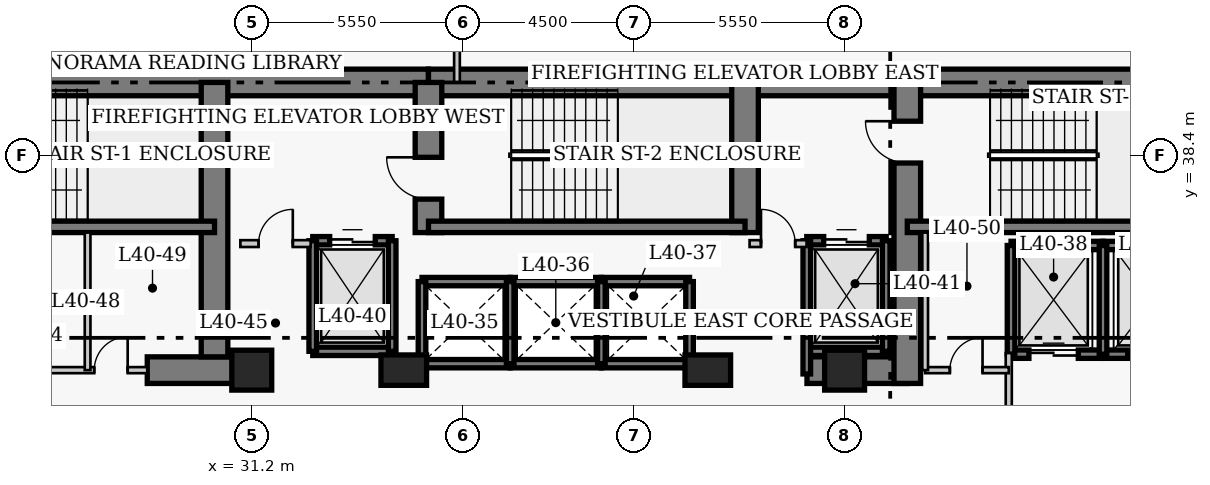
"""IFC4 building model, lengths in metres.
Left out: names, types, materials, properties, quantities, classifications, styles, units other than length and angle.
Written with IfcOpenShell. Run it as: python <this file> out.ifc"""

import sys

from ifc_helpers import new_model, si_unit, direction, frame, frame_2d, origin, origin_2d, place, context, subcontext, project, spatial, rectangle, extrude, element, fill, save


model = new_model("IFC4")
c1 = context("Model", 3, precision=1e-05, world=origin(), true_north=direction((0.0, 1.0)))
c2 = subcontext(c1, "Body", "Model", "MODEL_VIEW")
j1 = project(units=[si_unit("LENGTHUNIT", "METRE"), si_unit("PLANEANGLEUNIT", "RADIAN")], contexts=[c1])
p1 = place(None, origin())
s1 = spatial("IfcSite", under=j1, at=p1, CompositionType="ELEMENT")
p2 = place(p1, origin())
s2 = spatial("IfcBuilding", under=s1, at=p2, CompositionType="ELEMENT")
p3 = place(p2, frame((0.0, 0.0, 161.2)))
s3 = spatial("IfcBuildingStorey", under=s2, at=p3, CompositionType="ELEMENT", Elevation=161.2)
p4 = place(p3, frame((21.55, 40.32, 0.0), z_axis=(0.0, 0.0, 1.0), x_axis=(1.0, 0.0, 0.0)))
e1 = element("IfcWall", 1, at=p4, inside=s3, PredefinedType="SHEAR", context=c2, shape_type="SweptSolid", body=[
    extrude(rectangle(XDim=14.3, YDim=0.7, at=frame_2d((7.15, 0.0))), origin(), (0.0, 0.0, 1.0), 3.8),
])
p5 = place(p3, frame((35.85, 40.32, 0.0), z_axis=(0.0, 0.0, 1.0), x_axis=(1.0, 0.0, 0.0)))
e2 = element("IfcWall", 2, at=p5, inside=s3, PredefinedType="SHEAR", context=c2, shape_type="SweptSolid", body=[
    extrude(rectangle(XDim=12.6, YDim=0.7, at=frame_2d((6.3, 0.0))), origin(), (0.0, 0.0, 1.0), 3.8),
])
p6 = place(p3, frame((48.45, 40.32, 0.0), z_axis=(0.0, 0.0, 1.0), x_axis=(1.0, 0.0, 0.0)))
e3 = element("IfcWall", 3, at=p6, inside=s3, PredefinedType="SHEAR", context=c2, shape_type="SweptSolid", body=[
    extrude(rectangle(XDim=8.77, YDim=0.7, at=frame_2d((4.385, 0.0))), origin(), (0.0, 0.0, 1.0), 3.8),
])
p7 = place(p3, frame((28.45, 32.75, 0.0), z_axis=(0.0, 0.0, 1.0), x_axis=(1.0, 0.0, 0.0)))
e4 = element("IfcWall", 4, at=p7, inside=s3, PredefinedType="SHEAR", context=c2, shape_type="SweptSolid", body=[
    extrude(rectangle(XDim=2.4, YDim=0.7, at=frame_2d((1.2, 0.0))), origin(), (0.0, 0.0, 1.0), 3.8),
])
p8 = place(p3, frame((45.81, 32.75, 0.0), z_axis=(0.0, 0.0, 1.0), x_axis=(1.0, 0.0, 0.0)))
e5 = element("IfcWall", 5, at=p8, inside=s3, PredefinedType="SHEAR", context=c2, shape_type="SweptSolid", body=[
    extrude(rectangle(XDim=2.64, YDim=0.7, at=frame_2d((1.32, 0.0))), origin(), (0.0, 0.0, 1.0), 3.8),
])
p9 = place(p3, frame((30.22, 33.1, 0.0), z_axis=(0.0, 0.0, 1.0), x_axis=(0.0, 1.0, 0.0)))
e6 = element("IfcWall", 6, at=p9, inside=s3, PredefinedType="SHEAR", context=c2, shape_type="SweptSolid", body=[
    extrude(rectangle(XDim=7.22, YDim=0.7, at=frame_2d((3.61, 0.0))), origin(), (0.0, 0.0, 1.0), 3.8),
])
p10 = place(p3, frame((35.85, 36.37, 0.0), z_axis=(0.0, 0.0, 1.0), x_axis=(0.0, 1.0, 0.0)))
e7 = element("IfcWall", 7, at=p10, inside=s3, PredefinedType="SHEAR", context=c2, shape_type="SweptSolid", body=[
    extrude(rectangle(XDim=3.95, YDim=0.7, at=frame_2d((1.975, 0.0))), origin(), (0.0, 0.0, 1.0), 3.8),
])
p11 = place(p10, frame((0.88, 0.0, 0.0)))
e8 = element("IfcOpeningElement", 8, at=p11, cuts=e7, PredefinedType="OPENING", context=c2, shape_type="SweptSolid", body=[
    extrude(rectangle(XDim=1.1, YDim=2.15, at=frame_2d((0.55, 1.075))), frame((0.0, 0.36, 0.0), z_axis=(0.0, -1.0, 0.0), x_axis=(1.0, 0.0, 0.0)), (0.0, 0.0, 1.0), 0.72),
])
p12 = place(p3, frame((44.18, 36.37, 0.0), z_axis=(0.0, 0.0, 1.0), x_axis=(0.0, 1.0, 0.0)))
e9 = element("IfcWall", 9, at=p12, inside=s3, PredefinedType="SHEAR", context=c2, shape_type="SweptSolid", body=[
    extrude(rectangle(XDim=3.95, YDim=0.7, at=frame_2d((1.975, 0.0))), origin(), (0.0, 0.0, 1.0), 3.8),
])
p13 = place(p3, frame((48.45, 32.4, 0.0), z_axis=(0.0, 0.0, 1.0), x_axis=(0.0, 1.0, 0.0)))
e10 = element("IfcWall", 10, at=p13, inside=s3, PredefinedType="SHEAR", context=c2, shape_type="SweptSolid", body=[
    extrude(rectangle(XDim=7.92, YDim=0.7, at=frame_2d((3.96, 0.0))), origin(), (0.0, 0.0, 1.0), 3.8),
])
p14 = place(p13, frame((5.8, 0.0, 0.0)))
e11 = element("IfcOpeningElement", 11, at=p14, cuts=e10, PredefinedType="OPENING", context=c2, shape_type="SweptSolid", body=[
    extrude(rectangle(XDim=1.1, YDim=2.15, at=frame_2d((0.55, 1.075))), frame((0.0, 0.36, 0.0), z_axis=(0.0, -1.0, 0.0), x_axis=(1.0, 0.0, 0.0)), (0.0, 0.0, 1.0), 0.72),
])
p15 = place(p3, frame((21.9, 36.52, 0.0), z_axis=(0.0, 0.0, 1.0), x_axis=(1.0, 0.0, 0.0)))
e12 = element("IfcWall", 12, at=p15, inside=s3, PredefinedType="SHEAR", context=c2, shape_type="SweptSolid", body=[
    extrude(rectangle(XDim=8.32, YDim=0.3, at=frame_2d((4.16, 0.0))), origin(), (0.0, 0.0, 1.0), 3.8),
])
p16 = place(p15, frame((0.9, 0.0, 0.0)))
e13 = element("IfcOpeningElement", 13, at=p16, cuts=e12, PredefinedType="OPENING", context=c2, shape_type="SweptSolid", body=[
    extrude(rectangle(XDim=1.1, YDim=2.15, at=frame_2d((0.55, 1.075))), frame((0.0, 0.16, 0.0), z_axis=(0.0, -1.0, 0.0), x_axis=(1.0, 0.0, 0.0)), (0.0, 0.0, 1.0), 0.32),
])
p17 = place(p3, frame((35.85, 36.52, 0.0), z_axis=(0.0, 0.0, 1.0), x_axis=(1.0, 0.0, 0.0)))
e14 = element("IfcWall", 14, at=p17, inside=s3, PredefinedType="SHEAR", context=c2, shape_type="SweptSolid", body=[
    extrude(rectangle(XDim=8.33, YDim=0.3, at=frame_2d((4.165, 0.0))), origin(), (0.0, 0.0, 1.0), 3.8),
])
p18 = place(p3, frame((48.45, 36.52, 0.0), z_axis=(0.0, 0.0, 1.0), x_axis=(1.0, 0.0, 0.0)))
e15 = element("IfcWall", 15, at=p18, inside=s3, PredefinedType="SHEAR", context=c2, shape_type="SweptSolid", body=[
    extrude(rectangle(XDim=8.42, YDim=0.3, at=frame_2d((4.21, 0.0))), origin(), (0.0, 0.0, 1.0), 3.8),
])
p19 = place(p3, frame((31.2, 32.75, 0.0), z_axis=(0.0, 0.0, 1.0), x_axis=(1.0, 0.0, 0.0)))
e16 = element("IfcColumn", 16, at=p19, inside=s3, PredefinedType="COLUMN", context=c2, shape_type="SweptSolid", body=[
    extrude(rectangle(XDim=1.05, YDim=1.05, at=origin_2d()), origin(), (0.0, 0.0, 1.0), 3.8),
])
for number, where, z_axis, x_axis in (
    (17, (35.2, 32.75, 0.0), (0.0, 0.0, 1.0), (1.0, 0.0, 0.0)),
    (18, (43.2, 32.75, 0.0), (0.0, 0.0, 1.0), (1.0, 0.0, 0.0)),
):
    element("IfcColumn", number, at=place(p3, frame(where, z_axis=z_axis, x_axis=x_axis)), inside=s3, PredefinedType="COLUMN", context=c2, shape_type="SweptSolid", body=[
        extrude(rectangle(XDim=1.2, YDim=0.8, at=origin_2d()), origin(), (0.0, 0.0, 1.0), 3.8),
    ])
p20 = place(p3, frame((46.8, 32.75, 0.0), z_axis=(0.0, 0.0, 1.0), x_axis=(1.0, 0.0, 0.0)))
e19 = element("IfcColumn", 19, at=p20, inside=s3, PredefinedType="COLUMN", context=c2, shape_type="SweptSolid", body=[
    extrude(rectangle(XDim=1.05, YDim=1.05, at=origin_2d()), origin(), (0.0, 0.0, 1.0), 3.8),
])
for number, where, z_axis, x_axis in (
    (20, (35.68, 35.08, 0.0), (0.0, 0.0, 1.0), (1.0, 0.0, 0.0)),
    (21, (35.68, 32.92, 0.0), (0.0, 0.0, 1.0), (1.0, 0.0, 0.0)),
):
    element("IfcWall", number, at=place(p3, frame(where, z_axis=z_axis, x_axis=x_axis)), inside=s3, PredefinedType="SHEAR", context=c2, shape_type="SweptSolid", body=[
        extrude(rectangle(XDim=2.32, YDim=0.22, at=frame_2d((1.16, 0.0))), origin(), (0.0, 0.0, 1.0), 3.8),
    ])
p21 = place(p3, frame((35.68, 32.92, 0.0), z_axis=(0.0, 0.0, 1.0), x_axis=(0.0, 1.0, 0.0)))
e22 = element("IfcWall", 22, at=p21, inside=s3, PredefinedType="SHEAR", context=c2, shape_type="SweptSolid", body=[
    extrude(rectangle(XDim=2.16, YDim=0.2, at=frame_2d((1.08, 0.0))), origin(), (0.0, 0.0, 1.0), 3.8),
])
for number, where, z_axis, x_axis in (
    (23, (38.0, 35.08, 0.0), (0.0, 0.0, 1.0), (1.0, 0.0, 0.0)),
    (24, (38.0, 32.92, 0.0), (0.0, 0.0, 1.0), (1.0, 0.0, 0.0)),
):
    element("IfcWall", number, at=place(p3, frame(where, z_axis=z_axis, x_axis=x_axis)), inside=s3, PredefinedType="SHEAR", context=c2, shape_type="SweptSolid", body=[
        extrude(rectangle(XDim=2.4, YDim=0.22, at=frame_2d((1.2, 0.0))), origin(), (0.0, 0.0, 1.0), 3.8),
    ])
p22 = place(p3, frame((38.0, 32.92, 0.0), z_axis=(0.0, 0.0, 1.0), x_axis=(0.0, 1.0, 0.0)))
e25 = element("IfcWall", 25, at=p22, inside=s3, PredefinedType="SHEAR", context=c2, shape_type="SweptSolid", body=[
    extrude(rectangle(XDim=2.16, YDim=0.2, at=frame_2d((1.08, 0.0))), origin(), (0.0, 0.0, 1.0), 3.8),
])
for number, where, z_axis, x_axis in (
    (26, (40.4, 35.08, 0.0), (0.0, 0.0, 1.0), (1.0, 0.0, 0.0)),
    (27, (40.4, 32.92, 0.0), (0.0, 0.0, 1.0), (1.0, 0.0, 0.0)),
):
    element("IfcWall", number, at=place(p3, frame(where, z_axis=z_axis, x_axis=x_axis)), inside=s3, PredefinedType="SHEAR", context=c2, shape_type="SweptSolid", body=[
        extrude(rectangle(XDim=2.32, YDim=0.22, at=frame_2d((1.16, 0.0))), origin(), (0.0, 0.0, 1.0), 3.8),
    ])
for number, where, z_axis, x_axis in (
    (28, (40.4, 32.92, 0.0), (0.0, 0.0, 1.0), (0.0, 1.0, 0.0)),
    (29, (42.72, 32.92, 0.0), (0.0, 0.0, 1.0), (0.0, 1.0, 0.0)),
):
    element("IfcWall", number, at=place(p3, frame(where, z_axis=z_axis, x_axis=x_axis)), inside=s3, PredefinedType="SHEAR", context=c2, shape_type="SweptSolid", body=[
        extrude(rectangle(XDim=2.16, YDim=0.2, at=frame_2d((1.08, 0.0))), origin(), (0.0, 0.0, 1.0), 3.8),
    ])
p23 = place(p3, frame((51.18, 36.03, 0.0), z_axis=(0.0, 0.0, 1.0), x_axis=(1.0, 0.0, 0.0)))
e30 = element("IfcWall", 30, at=p23, inside=s3, PredefinedType="SHEAR", context=c2, shape_type="SweptSolid", body=[
    extrude(rectangle(XDim=2.42, YDim=0.22, at=frame_2d((1.21, 0.0))), origin(), (0.0, 0.0, 1.0), 3.8),
])
p24 = place(p3, frame((51.18, 33.17, 0.0), z_axis=(0.0, 0.0, 1.0), x_axis=(1.0, 0.0, 0.0)))
e31 = element("IfcWall", 31, at=p24, inside=s3, PredefinedType="SHEAR", context=c2, shape_type="SweptSolid", body=[
    extrude(rectangle(XDim=2.42, YDim=0.22, at=frame_2d((1.21, 0.0))), origin(), (0.0, 0.0, 1.0), 3.8),
])
p25 = place(p24, frame((0.47, 0.0, 0.0)))
e32 = element("IfcOpeningElement", 32, at=p25, cuts=e31, PredefinedType="OPENING", context=c2, shape_type="SweptSolid", body=[
    extrude(rectangle(XDim=1.3, YDim=2.15, at=frame_2d((0.65, 1.075))), frame((0.0, 0.12, 0.0), z_axis=(0.0, -1.0, 0.0), x_axis=(1.0, 0.0, 0.0)), (0.0, 0.0, 1.0), 0.24),
])
p26 = place(p3, frame((51.18, 33.17, 0.0), z_axis=(0.0, 0.0, 1.0), x_axis=(0.0, 1.0, 0.0)))
e33 = element("IfcWall", 33, at=p26, inside=s3, PredefinedType="SHEAR", context=c2, shape_type="SweptSolid", body=[
    extrude(rectangle(XDim=2.86, YDim=0.2, at=frame_2d((1.43, 0.0))), origin(), (0.0, 0.0, 1.0), 3.8),
])
p27 = place(p3, frame((53.6, 36.03, 0.0), z_axis=(0.0, 0.0, 1.0), x_axis=(1.0, 0.0, 0.0)))
e34 = element("IfcWall", 34, at=p27, inside=s3, PredefinedType="SHEAR", context=c2, shape_type="SweptSolid", body=[
    extrude(rectangle(XDim=2.42, YDim=0.22, at=frame_2d((1.21, 0.0))), origin(), (0.0, 0.0, 1.0), 3.8),
])
p28 = place(p3, frame((53.6, 33.17, 0.0), z_axis=(0.0, 0.0, 1.0), x_axis=(1.0, 0.0, 0.0)))
e35 = element("IfcWall", 35, at=p28, inside=s3, PredefinedType="SHEAR", context=c2, shape_type="SweptSolid", body=[
    extrude(rectangle(XDim=2.42, YDim=0.22, at=frame_2d((1.21, 0.0))), origin(), (0.0, 0.0, 1.0), 3.8),
])
p29 = place(p28, frame((0.65, 0.0, 0.0)))
e36 = element("IfcOpeningElement", 36, at=p29, cuts=e35, PredefinedType="OPENING", context=c2, shape_type="SweptSolid", body=[
    extrude(rectangle(XDim=1.3, YDim=2.15, at=frame_2d((0.65, 1.075))), frame((0.0, 0.12, 0.0), z_axis=(0.0, -1.0, 0.0), x_axis=(1.0, 0.0, 0.0)), (0.0, 0.0, 1.0), 0.24),
])
p30 = place(p3, frame((53.6, 33.17, 0.0), z_axis=(0.0, 0.0, 1.0), x_axis=(0.0, 1.0, 0.0)))
e37 = element("IfcWall", 37, at=p30, inside=s3, PredefinedType="SHEAR", context=c2, shape_type="SweptSolid", body=[
    extrude(rectangle(XDim=2.86, YDim=0.2, at=frame_2d((1.43, 0.0))), origin(), (0.0, 0.0, 1.0), 3.8),
])
p31 = place(p3, frame((32.805, 36.155, 0.0), z_axis=(0.0, 0.0, 1.0), x_axis=(1.0, 0.0, 0.0)))
e38 = element("IfcWall", 38, at=p31, inside=s3, PredefinedType="SHEAR", context=c2, shape_type="SweptSolid", body=[
    extrude(rectangle(XDim=2.09, YDim=0.22, at=frame_2d((1.045, 0.0))), origin(), (0.0, 0.0, 1.0), 3.8),
])
p32 = place(p31, frame((0.445, 0.0, 0.0)))
e39 = element("IfcOpeningElement", 39, at=p32, cuts=e38, PredefinedType="OPENING", context=c2, shape_type="SweptSolid", body=[
    extrude(rectangle(XDim=1.2, YDim=2.15, at=frame_2d((0.6, 1.075))), frame((0.0, 0.12, 0.0), z_axis=(0.0, -1.0, 0.0), x_axis=(1.0, 0.0, 0.0)), (0.0, 0.0, 1.0), 0.24),
])
p33 = place(p3, frame((32.805, 33.245, 0.0), z_axis=(0.0, 0.0, 1.0), x_axis=(1.0, 0.0, 0.0)))
e40 = element("IfcWall", 40, at=p33, inside=s3, PredefinedType="SHEAR", context=c2, shape_type="SweptSolid", body=[
    extrude(rectangle(XDim=2.09, YDim=0.22, at=frame_2d((1.045, 0.0))), origin(), (0.0, 0.0, 1.0), 3.8),
])
for number, where, z_axis, x_axis in (
    (41, (32.805, 33.245, 0.0), (0.0, 0.0, 1.0), (0.0, 1.0, 0.0)),
    (42, (34.895, 33.245, 0.0), (0.0, 0.0, 1.0), (0.0, 1.0, 0.0)),
):
    element("IfcWall", number, at=place(p3, frame(where, z_axis=z_axis, x_axis=x_axis)), inside=s3, PredefinedType="SHEAR", context=c2, shape_type="SweptSolid", body=[
        extrude(rectangle(XDim=2.91, YDim=0.2, at=frame_2d((1.455, 0.0))), origin(), (0.0, 0.0, 1.0), 3.8),
    ])
p34 = place(p3, frame((45.805, 36.155, 0.0), z_axis=(0.0, 0.0, 1.0), x_axis=(1.0, 0.0, 0.0)))
e43 = element("IfcWall", 43, at=p34, inside=s3, PredefinedType="SHEAR", context=c2, shape_type="SweptSolid", body=[
    extrude(rectangle(XDim=2.09, YDim=0.22, at=frame_2d((1.045, 0.0))), origin(), (0.0, 0.0, 1.0), 3.8),
])
p35 = place(p34, frame((0.445, 0.0, 0.0)))
e44 = element("IfcOpeningElement", 44, at=p35, cuts=e43, PredefinedType="OPENING", context=c2, shape_type="SweptSolid", body=[
    extrude(rectangle(XDim=1.2, YDim=2.15, at=frame_2d((0.6, 1.075))), frame((0.0, 0.12, 0.0), z_axis=(0.0, -1.0, 0.0), x_axis=(1.0, 0.0, 0.0)), (0.0, 0.0, 1.0), 0.24),
])
p36 = place(p3, frame((45.805, 33.245, 0.0), z_axis=(0.0, 0.0, 1.0), x_axis=(1.0, 0.0, 0.0)))
e45 = element("IfcWall", 45, at=p36, inside=s3, PredefinedType="SHEAR", context=c2, shape_type="SweptSolid", body=[
    extrude(rectangle(XDim=2.09, YDim=0.22, at=frame_2d((1.045, 0.0))), origin(), (0.0, 0.0, 1.0), 3.8),
])
p37 = place(p3, frame((45.805, 32.65, 0.0), z_axis=(0.0, 0.0, 1.0), x_axis=(0.0, 1.0, 0.0)))
e46 = element("IfcWall", 46, at=p37, inside=s3, PredefinedType="SHEAR", context=c2, shape_type="SweptSolid", body=[
    extrude(rectangle(XDim=3.505, YDim=0.2, at=frame_2d((1.752, 0.0))), origin(), (0.0, 0.0, 1.0), 3.8),
])
p38 = place(p3, frame((47.895, 33.245, 0.0), z_axis=(0.0, 0.0, 1.0), x_axis=(0.0, 1.0, 0.0)))
e47 = element("IfcWall", 47, at=p38, inside=s3, PredefinedType="SHEAR", context=c2, shape_type="SweptSolid", body=[
    extrude(rectangle(XDim=2.91, YDim=0.2, at=frame_2d((1.455, 0.0))), origin(), (0.0, 0.0, 1.0), 3.8),
])
p39 = place(p3, frame((30.9, 36.08, 0.0), z_axis=(0.0, 0.0, 1.0), x_axis=(1.0, 0.0, 0.0)))
e48 = element("IfcWall", 48, at=p39, inside=s3, PredefinedType="PARTITIONING", context=c2, shape_type="SweptSolid", body=[
    extrude(rectangle(XDim=1.85, YDim=0.18, at=frame_2d((0.925, 0.0))), origin(), (0.0, 0.0, 1.0), 3.55),
])
p40 = place(p39, frame((0.48, 0.0, 0.0)))
e49 = element("IfcOpeningElement", 49, at=p40, cuts=e48, PredefinedType="OPENING", context=c2, shape_type="SweptSolid", body=[
    extrude(rectangle(XDim=0.9, YDim=2.15, at=frame_2d((0.45, 1.075))), frame((0.0, 0.1, 0.0), z_axis=(0.0, -1.0, 0.0), x_axis=(1.0, 0.0, 0.0)), (0.0, 0.0, 1.0), 0.2),
])
p41 = place(p3, frame((44.3, 36.08, 0.0), z_axis=(0.0, 0.0, 1.0), x_axis=(1.0, 0.0, 0.0)))
e50 = element("IfcWall", 50, at=p41, inside=s3, PredefinedType="PARTITIONING", context=c2, shape_type="SweptSolid", body=[
    extrude(rectangle(XDim=1.5, YDim=0.18, at=frame_2d((0.75, 0.0))), origin(), (0.0, 0.0, 1.0), 3.55),
])
p42 = place(p41, frame((0.3, 0.0, 0.0)))
e51 = element("IfcOpeningElement", 51, at=p42, cuts=e50, PredefinedType="OPENING", context=c2, shape_type="SweptSolid", body=[
    extrude(rectangle(XDim=0.9, YDim=2.15, at=frame_2d((0.45, 1.075))), frame((0.0, 0.1, 0.0), z_axis=(0.0, -1.0, 0.0), x_axis=(1.0, 0.0, 0.0)), (0.0, 0.0, 1.0), 0.2),
])
p43 = place(p3, frame((51.12, 29.5, 0.0), z_axis=(0.0, 0.0, 1.0), x_axis=(0.0, 1.0, 0.0)))
e52 = element("IfcWall", 52, at=p43, inside=s3, PredefinedType="PARTITIONING", context=c2, shape_type="SweptSolid", body=[
    extrude(rectangle(XDim=3.7, YDim=0.16, at=frame_2d((1.85, 0.0))), origin(), (0.0, 0.0, 1.0), 3.55),
])
p44 = place(p43, frame((0.9, 0.0, 0.0)))
e53 = element("IfcOpeningElement", 53, at=p44, cuts=e52, PredefinedType="OPENING", context=c2, shape_type="SweptSolid", body=[
    extrude(rectangle(XDim=1.1, YDim=2.15, at=frame_2d((0.55, 1.075))), frame((0.0, 0.09, 0.0), z_axis=(0.0, -1.0, 0.0), x_axis=(1.0, 0.0, 0.0)), (0.0, 0.0, 1.0), 0.18),
])
p45 = place(p3, frame((24.48, 32.75, 0.0), z_axis=(0.0, 0.0, 1.0), x_axis=(1.0, 0.0, 0.0)))
e54 = element("IfcWall", 54, at=p45, inside=s3, PredefinedType="PARTITIONING", context=c2, shape_type="SweptSolid", body=[
    extrude(rectangle(XDim=3.97, YDim=0.16, at=frame_2d((1.985, 0.0))), origin(), (0.0, 0.0, 1.0), 3.55),
])
p46 = place(p45, frame((2.575, 0.0, 0.0)))
e55 = element("IfcOpeningElement", 55, at=p46, cuts=e54, PredefinedType="OPENING", context=c2, shape_type="SweptSolid", body=[
    extrude(rectangle(XDim=0.88, YDim=2.05, at=frame_2d((0.44, 1.025))), frame((0.0, 0.09, 0.0), z_axis=(0.0, -1.0, 0.0), x_axis=(1.0, 0.0, 0.0)), (0.0, 0.0, 1.0), 0.18),
])
p47 = place(p3, frame((48.92, 32.75, 0.0), z_axis=(0.0, 0.0, 1.0), x_axis=(1.0, 0.0, 0.0)))
e56 = element("IfcWall", 56, at=p47, inside=s3, PredefinedType="PARTITIONING", context=c2, shape_type="SweptSolid", body=[
    extrude(rectangle(XDim=2.2, YDim=0.16, at=frame_2d((1.1, 0.0))), origin(), (0.0, 0.0, 1.0), 3.55),
])
p48 = place(p47, frame((0.65, 0.0, 0.0)))
e57 = element("IfcOpeningElement", 57, at=p48, cuts=e56, PredefinedType="OPENING", context=c2, shape_type="SweptSolid", body=[
    extrude(rectangle(XDim=0.86, YDim=2.05, at=frame_2d((0.43, 1.025))), frame((0.0, 0.09, 0.0), z_axis=(0.0, -1.0, 0.0), x_axis=(1.0, 0.0, 0.0)), (0.0, 0.0, 1.0), 0.18),
])
for number, where, z_axis, x_axis in (
    (58, (48.92, 32.75, 0.0), (0.0, 0.0, 1.0), (0.0, 1.0, 0.0)),
    (59, (26.88, 32.75, 0.0), (0.0, 0.0, 1.0), (0.0, 1.0, 0.0)),
):
    element("IfcWall", number, at=place(p3, frame(where, z_axis=z_axis, x_axis=x_axis)), inside=s3, PredefinedType="PARTITIONING", context=c2, shape_type="SweptSolid", body=[
        extrude(rectangle(XDim=3.62, YDim=0.15, at=frame_2d((1.81, 0.0))), origin(), (0.0, 0.0, 1.0), 3.55),
    ])
p49 = place(p3, frame((36.6, 40.32, 0.0), z_axis=(0.0, 0.0, 1.0), x_axis=(0.0, 1.0, 0.0)))
e60 = element("IfcWall", 60, at=p49, inside=s3, PredefinedType="PARTITIONING", context=c2, shape_type="SweptSolid", body=[
    extrude(rectangle(XDim=1.845, YDim=0.15, at=frame_2d((0.922, 0.0))), origin(), (0.0, 0.0, 1.0), 3.55),
])
p50 = place(p25, origin())
e61 = element("IfcDoor", 61, at=p50, inside=s3, OperationType="DOUBLE_DOOR_SLIDING", PredefinedType="DOOR", context=c2, shape_type="SweptSolid", body=[
    extrude(rectangle(XDim=1.3, YDim=2.15, at=frame_2d((0.65, 1.075))), frame((0.0, 0.025, 0.0), z_axis=(0.0, -1.0, 0.0), x_axis=(1.0, 0.0, 0.0)), (0.0, 0.0, 1.0), 0.05),
])
fill(e32, e61)
p51 = place(p29, origin())
e62 = element("IfcDoor", 62, at=p51, inside=s3, OperationType="DOUBLE_DOOR_SLIDING", PredefinedType="DOOR", context=c2, shape_type="SweptSolid", body=[
    extrude(rectangle(XDim=1.3, YDim=2.15, at=frame_2d((0.65, 1.075))), frame((0.0, 0.025, 0.0), z_axis=(0.0, -1.0, 0.0), x_axis=(1.0, 0.0, 0.0)), (0.0, 0.0, 1.0), 0.05),
])
fill(e36, e62)
p52 = place(p32, origin())
e63 = element("IfcDoor", 63, at=p52, inside=s3, OperationType="DOUBLE_DOOR_SLIDING", PredefinedType="DOOR", context=c2, shape_type="SweptSolid", body=[
    extrude(rectangle(XDim=1.2, YDim=2.15, at=frame_2d((0.6, 1.075))), frame((0.0, 0.025, 0.0), z_axis=(0.0, -1.0, 0.0), x_axis=(1.0, 0.0, 0.0)), (0.0, 0.0, 1.0), 0.05),
])
fill(e39, e63)
p53 = place(p35, origin())
e64 = element("IfcDoor", 64, at=p53, inside=s3, OperationType="DOUBLE_DOOR_SLIDING", PredefinedType="DOOR", context=c2, shape_type="SweptSolid", body=[
    extrude(rectangle(XDim=1.2, YDim=2.15, at=frame_2d((0.6, 1.075))), frame((0.0, 0.025, 0.0), z_axis=(0.0, -1.0, 0.0), x_axis=(1.0, 0.0, 0.0)), (0.0, 0.0, 1.0), 0.05),
])
fill(e44, e64)
p54 = place(p40, origin())
e65 = element("IfcDoor", 65, at=p54, inside=s3, OperationType="SINGLE_SWING_RIGHT", PredefinedType="DOOR", context=c2, shape_type="SweptSolid", body=[
    extrude(rectangle(XDim=0.9, YDim=2.15, at=frame_2d((0.45, 1.075))), frame((0.0, 0.025, 0.0), z_axis=(0.0, -1.0, 0.0), x_axis=(1.0, 0.0, 0.0)), (0.0, 0.0, 1.0), 0.05),
])
fill(e49, e65)
p55 = place(p42, origin())
e66 = element("IfcDoor", 66, at=p55, inside=s3, OperationType="SINGLE_SWING_LEFT", PredefinedType="DOOR", context=c2, shape_type="SweptSolid", body=[
    extrude(rectangle(XDim=0.9, YDim=2.15, at=frame_2d((0.45, 1.075))), frame((0.0, 0.025, 0.0), z_axis=(0.0, -1.0, 0.0), x_axis=(1.0, 0.0, 0.0)), (0.0, 0.0, 1.0), 0.05),
])
fill(e51, e66)
p56 = place(p46, origin())
e67 = element("IfcDoor", 67, at=p56, inside=s3, OperationType="SINGLE_SWING_RIGHT", PredefinedType="DOOR", context=c2, shape_type="SweptSolid", body=[
    extrude(rectangle(XDim=0.88, YDim=2.05, at=frame_2d((0.44, 1.025))), frame((0.0, 0.025, 0.0), z_axis=(0.0, -1.0, 0.0), x_axis=(1.0, 0.0, 0.0)), (0.0, 0.0, 1.0), 0.05),
])
fill(e55, e67)
p57 = place(p48, origin())
e68 = element("IfcDoor", 68, at=p57, inside=s3, OperationType="SINGLE_SWING_RIGHT", PredefinedType="DOOR", context=c2, shape_type="SweptSolid", body=[
    extrude(rectangle(XDim=0.86, YDim=2.05, at=frame_2d((0.43, 1.025))), frame((0.0, 0.025, 0.0), z_axis=(0.0, -1.0, 0.0), x_axis=(1.0, 0.0, 0.0)), (0.0, 0.0, 1.0), 0.05),
])
fill(e57, e68)
p58 = place(p11, origin())
e69 = element("IfcDoor", 69, at=p58, inside=s3, OperationType="SINGLE_SWING_RIGHT", PredefinedType="DOOR", context=c2, shape_type="SweptSolid", body=[
    extrude(rectangle(XDim=1.1, YDim=2.15, at=frame_2d((0.55, 1.075))), frame((0.0, 0.025, 0.0), z_axis=(0.0, -1.0, 0.0), x_axis=(1.0, 0.0, 0.0)), (0.0, 0.0, 1.0), 0.05),
])
fill(e8, e69)
p59 = place(p14, origin())
e70 = element("IfcDoor", 70, at=p59, inside=s3, OperationType="SINGLE_SWING_RIGHT", PredefinedType="DOOR", context=c2, shape_type="SweptSolid", body=[
    extrude(rectangle(XDim=1.1, YDim=2.15, at=frame_2d((0.55, 1.075))), frame((0.0, 0.025, 0.0), z_axis=(0.0, -1.0, 0.0), x_axis=(1.0, 0.0, 0.0)), (0.0, 0.0, 1.0), 0.05),
])
fill(e11, e70)
save(model, sys.argv[1])
